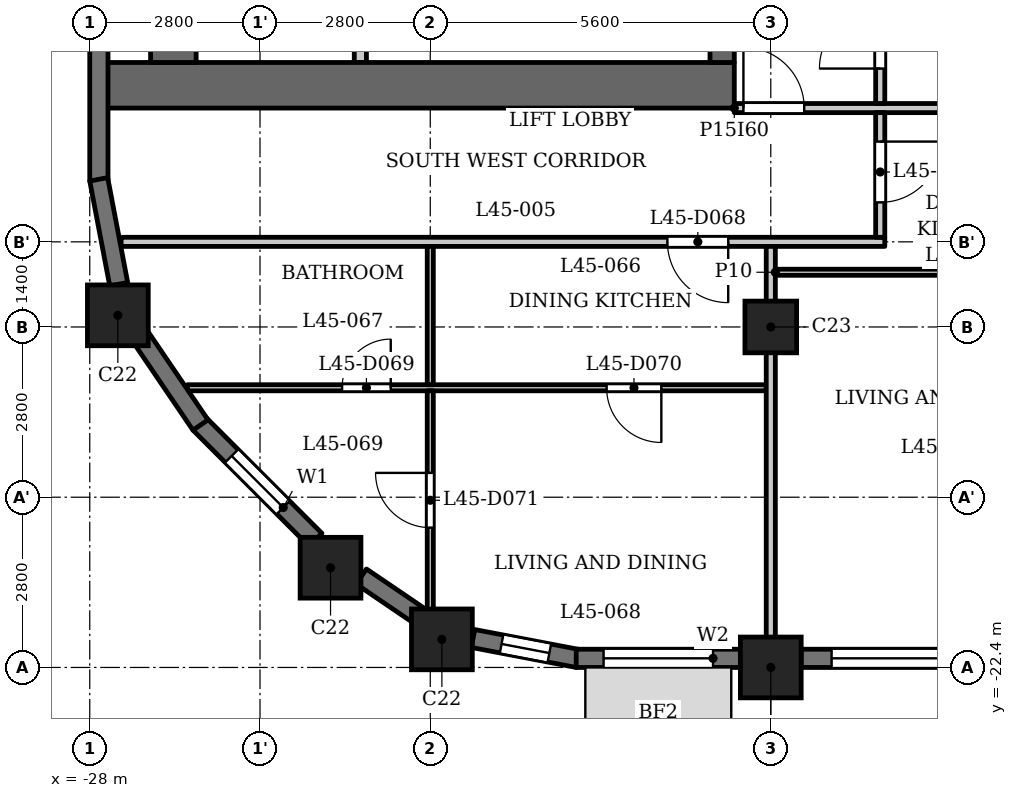
"""IFC4 building model, lengths in metres.
Left out: names, types, materials, properties, quantities, classifications, styles, units other than length and angle.
Written with IfcOpenShell. Run it as: python <this file> out.ifc"""

import sys

from ifc_helpers import new_model, si_unit, direction, frame, frame_2d, origin, origin_2d, place, context, subcontext, project, spatial, rectangle, extrude, element, fill, save


model = new_model("IFC4")
c1 = context("Model", 3, precision=1e-05, world=origin(), true_north=direction((0.0, 1.0)))
c2 = subcontext(c1, "Body", "Model", "MODEL_VIEW")
j1 = project(units=[si_unit("LENGTHUNIT", "METRE"), si_unit("PLANEANGLEUNIT", "RADIAN")], contexts=[c1])
p1 = place(None, origin())
s1 = spatial("IfcSite", under=j1, at=p1, CompositionType="ELEMENT")
p2 = place(p1, origin())
s2 = spatial("IfcBuilding", under=s1, at=p2, CompositionType="ELEMENT")
p3 = place(p2, frame((0.0, 0.0, 174.6)))
s3 = spatial("IfcBuildingStorey", under=s2, at=p3, CompositionType="ELEMENT", Elevation=174.6)
for number, where, z_axis, x_axis in (
    (1, (-22.209, -21.938, 0.0), (0.0, 0.0, 1.0), (1.0, 0.0, 0.0)),
    (2, (-16.8, -22.4, 0.0), (0.0, 0.0, 1.0), (1.0, 0.0, 0.0)),
    (3, (-27.538, -16.609, 0.0), (0.0, 0.0, 1.0), (1.0, 0.0, 0.0)),
    (4, (-24.04, -20.76, 0.0), (0.0, 0.0, 1.0), (1.0, 0.0, 0.0)),
):
    element("IfcColumn", number, at=place(p3, frame(where, z_axis=z_axis, x_axis=x_axis)), inside=s3, PredefinedType="COLUMN", context=c2, shape_type="SweptSolid", body=[
        extrude(rectangle(XDim=1.0, YDim=1.0, at=origin_2d()), origin(), (0.0, 0.0, 1.0), 3.5),
    ])
p4 = place(p3, frame((-16.8, -16.8, 0.0), z_axis=(0.0, 0.0, 1.0), x_axis=(1.0, 0.0, 0.0)))
e5 = element("IfcColumn", 5, at=p4, inside=s3, PredefinedType="COLUMN", context=c2, shape_type="SweptSolid", body=[
    extrude(rectangle(XDim=0.85, YDim=0.85, at=origin_2d()), origin(), (0.0, 0.0, 1.0), 3.5),
])
p5 = place(p3, frame((-26.197, -18.391, 0.0), z_axis=(0.0, 0.0, 1.0), x_axis=(0.707061571201, -0.707151988282, 0.0)))
e6 = element("IfcWall", 6, at=p5, inside=s3, PredefinedType="SOLIDWALL", context=c2, shape_type="SweptSolid", body=[
    extrude(rectangle(XDim=2.7, YDim=0.3, at=frame_2d((1.35, 0.0))), origin(), (0.0, 0.0, 1.0), 2.4),
])
p6 = place(p5, frame((0.75, 0.0, 0.6)))
e7 = element("IfcOpeningElement", 7, at=p6, cuts=e6, PredefinedType="OPENING", context=c2, shape_type="SweptSolid", body=[
    extrude(rectangle(XDim=1.2, YDim=1.55, at=frame_2d((0.6, 0.775))), frame((0.0, 0.16, 0.0), z_axis=(0.0, -1.0, 0.0), x_axis=(1.0, 0.0, 0.0)), (0.0, 0.0, 1.0), 0.32),
])
p7 = place(p3, frame((-23.534, -20.904, 0.0), z_axis=(0.0, 0.0, 1.0), x_axis=(0.827103906596, -0.56204904385, 0.0)))
e8 = element("IfcWall", 8, at=p7, inside=s3, PredefinedType="SOLIDWALL", context=c2, shape_type="SweptSolid", body=[
    extrude(rectangle(XDim=1.177, YDim=0.3, at=frame_2d((0.589, 0.0))), origin(), (0.0, 0.0, 1.0), 3.15),
])
p8 = place(p3, frame((-21.697, -21.924, 0.0), z_axis=(0.0, 0.0, 1.0), x_axis=(0.982284988433, -0.187393173565, 0.0)))
e9 = element("IfcWall", 9, at=p8, inside=s3, PredefinedType="SOLIDWALL", context=c2, shape_type="SweptSolid", body=[
    extrude(rectangle(XDim=1.756, YDim=0.3, at=frame_2d((0.878, 0.0))), origin(), (0.0, 0.0, 1.0), 2.4),
])
p9 = place(p8, frame((0.478, 0.0, 0.6)))
e10 = element("IfcOpeningElement", 10, at=p9, cuts=e9, PredefinedType="OPENING", context=c2, shape_type="SweptSolid", body=[
    extrude(rectangle(XDim=0.8, YDim=1.55, at=frame_2d((0.4, 0.775))), frame((0.0, 0.16, 0.0), z_axis=(0.0, -1.0, 0.0), x_axis=(1.0, 0.0, 0.0)), (0.0, 0.0, 1.0), 0.32),
])
p10 = place(p3, frame((-20.0, -22.25, 0.0), z_axis=(0.0, 0.0, 1.0), x_axis=(1.0, 0.0, 0.0)))
e11 = element("IfcWall", 11, at=p10, inside=s3, PredefinedType="SOLIDWALL", context=c2, shape_type="SweptSolid", body=[
    extrude(rectangle(XDim=2.7, YDim=0.3, at=frame_2d((1.35, 0.0))), origin(), (0.0, 0.0, 1.0), 2.4),
])
p11 = place(p10, frame((0.45, 0.0, 0.9)))
e12 = element("IfcOpeningElement", 12, at=p11, cuts=e11, PredefinedType="OPENING", context=c2, shape_type="SweptSolid", body=[
    extrude(rectangle(XDim=1.8, YDim=1.25, at=frame_2d((0.9, 0.625))), frame((0.0, 0.16, 0.0), z_axis=(0.0, -1.0, 0.0), x_axis=(1.0, 0.0, 0.0)), (0.0, 0.0, 1.0), 0.32),
])
p12 = place(p3, frame((-16.3, -22.25, 0.0), z_axis=(0.0, 0.0, 1.0), x_axis=(1.0, 0.0, 0.0)))
e13 = element("IfcWall", 13, at=p12, inside=s3, PredefinedType="SOLIDWALL", context=c2, shape_type="SweptSolid", body=[
    extrude(rectangle(XDim=4.6, YDim=0.3, at=frame_2d((2.3, 0.0))), origin(), (0.0, 0.0, 1.0), 2.4),
])
p13 = place(p12, frame((0.5, 0.0, 1.2)))
e14 = element("IfcOpeningElement", 14, at=p13, cuts=e13, PredefinedType="OPENING", context=c2, shape_type="SweptSolid", body=[
    extrude(rectangle(XDim=3.6, YDim=0.95, at=frame_2d((1.8, 0.475))), frame((0.0, 0.16, 0.0), z_axis=(0.0, -1.0, 0.0), x_axis=(1.0, 0.0, 0.0)), (0.0, 0.0, 1.0), 0.32),
])
p14 = place(p3, frame((-27.85, -11.7, 0.0), z_axis=(0.0, 0.0, 1.0), x_axis=(0.0, -1.0, 0.0)))
e15 = element("IfcWall", 15, at=p14, inside=s3, PredefinedType="SOLIDWALL", context=c2, shape_type="SweptSolid", body=[
    extrude(rectangle(XDim=2.7, YDim=0.3, at=frame_2d((1.35, 0.0))), origin(), (0.0, 0.0, 1.0), 2.4),
])
for number, where, z_axis, x_axis in (
    (16, (-27.853, -14.372, 0.0), (0.0, 0.0, 1.0), (0.187, -0.982, 0.0)),
    (17, (-27.166, -16.96, 0.0), (0.0, 0.0, 1.0), (0.562, -0.827, 0.0)),
):
    element("IfcWall", number, at=place(p3, frame(where, z_axis=z_axis, x_axis=x_axis)), inside=s3, PredefinedType="SOLIDWALL", context=c2, shape_type="SweptSolid", body=[
        extrude(rectangle(XDim=1.756, YDim=0.3, at=frame_2d((0.878, 0.0))), origin(), (0.0, 0.0, 1.0), 2.4),
    ])
p15 = place(p3, frame((-17.4, -12.825, 0.0), z_axis=(0.0, 0.0, 1.0), x_axis=(-1.0, 0.0, 0.0)))
e18 = element("IfcWall", 18, at=p15, inside=s3, PredefinedType="SHEAR", context=c2, shape_type="SweptSolid", body=[
    extrude(rectangle(XDim=10.4, YDim=0.75, at=frame_2d((5.2, 0.0))), origin(), (0.0, 0.0, 1.0), 3.15),
])
p16 = place(p3, frame((-17.6, -12.45, 0.0), z_axis=(0.0, 0.0, 1.0), x_axis=(0.0, 1.0, 0.0)))
e19 = element("IfcWall", 19, at=p16, inside=s3, PredefinedType="SHEAR", context=c2, shape_type="SweptSolid", body=[
    extrude(rectangle(XDim=24.9, YDim=0.4, at=frame_2d((12.45, 0.0))), origin(), (0.0, 0.0, 1.0), 3.15),
])
p17 = place(p16, frame((8.65, 0.0, 0.0)))
e20 = element("IfcOpeningElement", 20, at=p17, cuts=e19, PredefinedType="OPENING", context=c2, shape_type="SweptSolid", body=[
    extrude(rectangle(XDim=0.9, YDim=2.1, at=frame_2d((0.45, 1.05))), frame((0.0, 0.21, 0.0), z_axis=(0.0, -1.0, 0.0), x_axis=(1.0, 0.0, 0.0)), (0.0, 0.0, 1.0), 0.42),
])
p18 = place(p16, frame((15.6, 0.0, 0.0)))
e21 = element("IfcOpeningElement", 21, at=p18, cuts=e19, PredefinedType="OPENING", context=c2, shape_type="SweptSolid", body=[
    extrude(rectangle(XDim=1.1, YDim=2.1, at=frame_2d((0.55, 1.05))), frame((0.0, 0.21, 0.0), z_axis=(0.0, -1.0, 0.0), x_axis=(1.0, 0.0, 0.0)), (0.0, 0.0, 1.0), 0.42),
])
p19 = place(p16, frame((18.0, 0.0, 0.0)))
e22 = element("IfcOpeningElement", 22, at=p19, cuts=e19, PredefinedType="OPENING", context=c2, shape_type="SweptSolid", body=[
    extrude(rectangle(XDim=1.1, YDim=2.1, at=frame_2d((0.55, 1.05))), frame((0.0, 0.21, 0.0), z_axis=(0.0, -1.0, 0.0), x_axis=(1.0, 0.0, 0.0)), (0.0, 0.0, 1.0), 0.42),
])
p20 = place(p16, frame((23.025, 0.0, 0.0)))
e23 = element("IfcOpeningElement", 23, at=p20, cuts=e19, PredefinedType="OPENING", context=c2, shape_type="SweptSolid", body=[
    extrude(rectangle(XDim=1.1, YDim=2.1, at=frame_2d((0.55, 1.05))), frame((0.0, 0.21, 0.0), z_axis=(0.0, -1.0, 0.0), x_axis=(1.0, 0.0, 0.0)), (0.0, 0.0, 1.0), 0.42),
])
p21 = place(p16, frame((0.775, 0.0, 0.0)))
e24 = element("IfcOpeningElement", 24, at=p21, cuts=e19, PredefinedType="OPENING", context=c2, shape_type="SweptSolid", body=[
    extrude(rectangle(XDim=1.1, YDim=2.1, at=frame_2d((0.55, 1.05))), frame((0.0, 0.21, 0.0), z_axis=(0.0, -1.0, 0.0), x_axis=(1.0, 0.0, 0.0)), (0.0, 0.0, 1.0), 0.42),
])
p22 = place(p16, frame((12.925, 0.0, 0.0)))
e25 = element("IfcOpeningElement", 25, at=p22, cuts=e19, PredefinedType="OPENING", context=c2, shape_type="SweptSolid", body=[
    extrude(rectangle(XDim=1.8, YDim=2.1, at=frame_2d((0.9, 1.05))), frame((0.0, 0.21, 0.0), z_axis=(0.0, -1.0, 0.0), x_axis=(1.0, 0.0, 0.0)), (0.0, 0.0, 1.0), 0.42),
])
p23 = place(p3, frame((-26.625, -12.45, 0.0), z_axis=(0.0, 0.0, 1.0), x_axis=(0.0, 1.0, 0.0)))
e26 = element("IfcWall", 26, at=p23, inside=s3, PredefinedType="SHEAR", context=c2, shape_type="SweptSolid", body=[
    extrude(rectangle(XDim=24.9, YDim=0.75, at=frame_2d((12.45, 0.0))), origin(), (0.0, 0.0, 1.0), 3.15),
])
p24 = place(p3, frame((-23.55, -12.45, 0.0), z_axis=(0.0, 0.0, 1.0), x_axis=(0.0, 1.0, 0.0)))
e27 = element("IfcWall", 27, at=p24, inside=s3, PredefinedType="PARTITIONING", context=c2, shape_type="SweptSolid", body=[
    extrude(rectangle(XDim=2.65, YDim=0.2, at=frame_2d((1.325, 0.0))), origin(), (0.0, 0.0, 1.0), 3.15),
])
p25 = place(p24, frame((0.875, 0.0, 0.0)))
e28 = element("IfcOpeningElement", 28, at=p25, cuts=e27, PredefinedType="OPENING", context=c2, shape_type="SweptSolid", body=[
    extrude(rectangle(XDim=0.9, YDim=2.1, at=frame_2d((0.45, 1.05))), frame((0.0, 0.11, 0.0), z_axis=(0.0, -1.0, 0.0), x_axis=(1.0, 0.0, 0.0)), (0.0, 0.0, 1.0), 0.22),
])
p26 = place(p3, frame((-26.394, -17.8, 0.0), z_axis=(0.0, 0.0, 1.0), x_axis=(1.0, 0.0, 0.0)))
e29 = element("IfcWall", 29, at=p26, inside=s3, PredefinedType="PARTITIONING", context=c2, shape_type="SweptSolid", body=[
    extrude(rectangle(XDim=9.519, YDim=0.1, at=frame_2d((4.76, 0.0))), origin(), (0.0, 0.0, 1.0), 3.15),
])
p27 = place(p26, frame((2.544, 0.0, 0.0)))
e30 = element("IfcOpeningElement", 30, at=p27, cuts=e29, PredefinedType="OPENING", context=c2, shape_type="SweptSolid", body=[
    extrude(rectangle(XDim=0.8, YDim=2.1, at=frame_2d((0.4, 1.05))), frame((0.0, 0.06, 0.0), z_axis=(0.0, -1.0, 0.0), x_axis=(1.0, 0.0, 0.0)), (0.0, 0.0, 1.0), 0.12),
])
p28 = place(p26, frame((6.894, 0.0, 0.0)))
e31 = element("IfcOpeningElement", 31, at=p28, cuts=e29, PredefinedType="OPENING", context=c2, shape_type="SweptSolid", body=[
    extrude(rectangle(XDim=0.9, YDim=2.1, at=frame_2d((0.45, 1.05))), frame((0.0, 0.06, 0.0), z_axis=(0.0, -1.0, 0.0), x_axis=(1.0, 0.0, 0.0)), (0.0, 0.0, 1.0), 0.12),
])
p29 = place(p3, frame((-16.725, -15.9, 0.0), z_axis=(0.0, 0.0, 1.0), x_axis=(1.0, 0.0, 0.0)))
e32 = element("IfcWall", 32, at=p29, inside=s3, PredefinedType="PARTITIONING", context=c2, shape_type="SweptSolid", body=[
    extrude(rectangle(XDim=33.45, YDim=0.1, at=frame_2d((16.725, 0.0))), origin(), (0.0, 0.0, 1.0), 3.15),
])
p30 = place(p29, frame((9.675, 0.0, 0.0)))
e33 = element("IfcOpeningElement", 33, at=p30, cuts=e32, PredefinedType="OPENING", context=c2, shape_type="SweptSolid", body=[
    extrude(rectangle(XDim=0.8, YDim=2.1, at=frame_2d((0.4, 1.05))), frame((0.0, 0.06, 0.0), z_axis=(0.0, -1.0, 0.0), x_axis=(1.0, 0.0, 0.0)), (0.0, 0.0, 1.0), 0.12),
])
p31 = place(p29, frame((4.075, 0.0, 0.0)))
e34 = element("IfcOpeningElement", 34, at=p31, cuts=e32, PredefinedType="OPENING", context=c2, shape_type="SweptSolid", body=[
    extrude(rectangle(XDim=0.9, YDim=2.1, at=frame_2d((0.45, 1.05))), frame((0.0, 0.06, 0.0), z_axis=(0.0, -1.0, 0.0), x_axis=(1.0, 0.0, 0.0)), (0.0, 0.0, 1.0), 0.12),
])
p32 = place(p29, frame((20.875, 0.0, 0.0)))
e35 = element("IfcOpeningElement", 35, at=p32, cuts=e32, PredefinedType="OPENING", context=c2, shape_type="SweptSolid", body=[
    extrude(rectangle(XDim=0.8, YDim=2.1, at=frame_2d((0.4, 1.05))), frame((0.0, 0.06, 0.0), z_axis=(0.0, -1.0, 0.0), x_axis=(1.0, 0.0, 0.0)), (0.0, 0.0, 1.0), 0.12),
])
p33 = place(p29, frame((15.275, 0.0, 0.0)))
e36 = element("IfcOpeningElement", 36, at=p33, cuts=e32, PredefinedType="OPENING", context=c2, shape_type="SweptSolid", body=[
    extrude(rectangle(XDim=0.9, YDim=2.1, at=frame_2d((0.45, 1.05))), frame((0.0, 0.06, 0.0), z_axis=(0.0, -1.0, 0.0), x_axis=(1.0, 0.0, 0.0)), (0.0, 0.0, 1.0), 0.12),
])
p34 = place(p29, frame((30.825, 0.0, 0.0)))
e37 = element("IfcOpeningElement", 37, at=p34, cuts=e32, PredefinedType="OPENING", context=c2, shape_type="SweptSolid", body=[
    extrude(rectangle(XDim=0.8, YDim=2.1, at=frame_2d((0.4, 1.05))), frame((0.0, 0.06, 0.0), z_axis=(0.0, -1.0, 0.0), x_axis=(1.0, 0.0, 0.0)), (0.0, 0.0, 1.0), 0.12),
])
p35 = place(p29, frame((26.475, 0.0, 0.0)))
e38 = element("IfcOpeningElement", 38, at=p35, cuts=e32, PredefinedType="OPENING", context=c2, shape_type="SweptSolid", body=[
    extrude(rectangle(XDim=0.9, YDim=2.1, at=frame_2d((0.45, 1.05))), frame((0.0, 0.06, 0.0), z_axis=(0.0, -1.0, 0.0), x_axis=(1.0, 0.0, 0.0)), (0.0, 0.0, 1.0), 0.12),
])
p36 = place(p3, frame((-27.484, -15.4, 0.0), z_axis=(0.0, 0.0, 1.0), x_axis=(1.0, 0.0, 0.0)))
e39 = element("IfcWall", 39, at=p36, inside=s3, PredefinedType="PARTITIONING", context=c2, shape_type="SweptSolid", body=[
    extrude(rectangle(XDim=12.559, YDim=0.15, at=frame_2d((6.279, 0.0))), origin(), (0.0, 0.0, 1.0), 3.15),
])
p37 = place(p36, frame((8.984, 0.0, 0.0)))
e40 = element("IfcOpeningElement", 40, at=p37, cuts=e39, PredefinedType="OPENING", context=c2, shape_type="SweptSolid", body=[
    extrude(rectangle(XDim=1.0, YDim=2.1, at=frame_2d((0.5, 1.05))), frame((0.0, 0.085, 0.0), z_axis=(0.0, -1.0, 0.0), x_axis=(1.0, 0.0, 0.0)), (0.0, 0.0, 1.0), 0.17),
])
p38 = place(p3, frame((-17.4, -13.2, 0.0), z_axis=(0.0, 0.0, 1.0), x_axis=(1.0, 0.0, 0.0)))
e41 = element("IfcWall", 41, at=p38, inside=s3, PredefinedType="PARTITIONING", context=c2, shape_type="SweptSolid", body=[
    extrude(rectangle(XDim=34.8, YDim=0.15, at=frame_2d((17.4, 0.0))), origin(), (0.0, 0.0, 1.0), 3.15),
])
p39 = place(p38, frame((0.15, 0.0, 0.0)))
e42 = element("IfcOpeningElement", 42, at=p39, cuts=e41, PredefinedType="OPENING", context=c2, shape_type="SweptSolid", body=[
    extrude(rectangle(XDim=1.0, YDim=2.1, at=frame_2d((0.5, 1.05))), frame((0.0, 0.085, 0.0), z_axis=(0.0, -1.0, 0.0), x_axis=(1.0, 0.0, 0.0)), (0.0, 0.0, 1.0), 0.17),
])
p40 = place(p38, frame((33.55, 0.0, 0.0)))
e43 = element("IfcOpeningElement", 43, at=p40, cuts=e41, PredefinedType="OPENING", context=c2, shape_type="SweptSolid", body=[
    extrude(rectangle(XDim=1.0, YDim=2.1, at=frame_2d((0.5, 1.05))), frame((0.0, 0.085, 0.0), z_axis=(0.0, -1.0, 0.0), x_axis=(1.0, 0.0, 0.0)), (0.0, 0.0, 1.0), 0.17),
])
p41 = place(p38, frame((15.7, 0.0, 0.0)))
e44 = element("IfcOpeningElement", 44, at=p41, cuts=e41, PredefinedType="OPENING", context=c2, shape_type="SweptSolid", body=[
    extrude(rectangle(XDim=1.0, YDim=2.1, at=frame_2d((0.5, 1.05))), frame((0.0, 0.085, 0.0), z_axis=(0.0, -1.0, 0.0), x_axis=(1.0, 0.0, 0.0)), (0.0, 0.0, 1.0), 0.17),
])
p42 = place(p38, frame((26.9, 0.0, 0.0)))
e45 = element("IfcOpeningElement", 45, at=p42, cuts=e41, PredefinedType="OPENING", context=c2, shape_type="SweptSolid", body=[
    extrude(rectangle(XDim=1.0, YDim=2.1, at=frame_2d((0.5, 1.05))), frame((0.0, 0.085, 0.0), z_axis=(0.0, -1.0, 0.0), x_axis=(1.0, 0.0, 0.0)), (0.0, 0.0, 1.0), 0.17),
])
p43 = place(p3, frame((-22.4, -21.72, 0.0), z_axis=(0.0, 0.0, 1.0), x_axis=(0.0, 1.0, 0.0)))
e46 = element("IfcWall", 46, at=p43, inside=s3, PredefinedType="PARTITIONING", context=c2, shape_type="SweptSolid", body=[
    extrude(rectangle(XDim=3.87, YDim=0.1, at=frame_2d((1.935, 0.0))), origin(), (0.0, 0.0, 1.0), 3.15),
])
p44 = place(p43, frame((1.62, 0.0, 0.0)))
e47 = element("IfcOpeningElement", 47, at=p44, cuts=e46, PredefinedType="OPENING", context=c2, shape_type="SweptSolid", body=[
    extrude(rectangle(XDim=0.9, YDim=2.1, at=frame_2d((0.45, 1.05))), frame((0.0, 0.06, 0.0), z_axis=(0.0, -1.0, 0.0), x_axis=(1.0, 0.0, 0.0)), (0.0, 0.0, 1.0), 0.12),
])
p45 = place(p3, frame((-22.4, -17.75, 0.0), z_axis=(0.0, 0.0, 1.0), x_axis=(0.0, 1.0, 0.0)))
e48 = element("IfcWall", 48, at=p45, inside=s3, PredefinedType="PARTITIONING", context=c2, shape_type="SweptSolid", body=[
    extrude(rectangle(XDim=2.275, YDim=0.1, at=frame_2d((1.137, 0.0))), origin(), (0.0, 0.0, 1.0), 3.15),
])
p46 = place(p3, frame((-16.8, -22.88, 0.0), z_axis=(0.0, 0.0, 1.0), x_axis=(0.0, 1.0, 0.0)))
e49 = element("IfcWall", 49, at=p46, inside=s3, PredefinedType="PARTITIONING", context=c2, shape_type="SweptSolid", body=[
    extrude(rectangle(XDim=7.405, YDim=0.15, at=frame_2d((3.702, 0.0))), origin(), (0.0, 0.0, 1.0), 3.15),
])
p47 = place(p3, frame((-15.0, -15.325, 0.0), z_axis=(0.0, 0.0, 1.0), x_axis=(0.0, 1.0, 0.0)))
e50 = element("IfcWall", 50, at=p47, inside=s3, PredefinedType="PARTITIONING", context=c2, shape_type="SweptSolid", body=[
    extrude(rectangle(XDim=2.05, YDim=0.15, at=frame_2d((1.025, 0.0))), origin(), (0.0, 0.0, 1.0), 3.15),
])
p48 = place(p47, frame((0.574, 0.0, 0.0)))
e51 = element("IfcOpeningElement", 51, at=p48, cuts=e50, PredefinedType="OPENING", context=c2, shape_type="SweptSolid", body=[
    extrude(rectangle(XDim=1.0, YDim=2.1, at=frame_2d((0.5, 1.05))), frame((0.0, 0.085, 0.0), z_axis=(0.0, -1.0, 0.0), x_axis=(1.0, 0.0, 0.0)), (0.0, 0.0, 1.0), 0.17),
])
p49 = place(p3, frame((-15.0, -13.125, 0.0), z_axis=(0.0, 0.0, 1.0), x_axis=(0.0, 1.0, 0.0)))
e52 = element("IfcWall", 52, at=p49, inside=s3, PredefinedType="PARTITIONING", context=c2, shape_type="SweptSolid", body=[
    extrude(rectangle(XDim=6.356, YDim=0.15, at=frame_2d((3.178, 0.0))), origin(), (0.0, 0.0, 1.0), 3.15),
])
p50 = place(p49, frame((0.575, 0.0, 0.0)))
e53 = element("IfcOpeningElement", 53, at=p50, cuts=e52, PredefinedType="OPENING", context=c2, shape_type="SweptSolid", body=[
    extrude(rectangle(XDim=1.0, YDim=2.1, at=frame_2d((0.5, 1.05))), frame((0.0, 0.085, 0.0), z_axis=(0.0, -1.0, 0.0), x_axis=(1.0, 0.0, 0.0)), (0.0, 0.0, 1.0), 0.17),
])
p51 = place(p50, origin())
e54 = element("IfcDoor", 54, at=p51, inside=s3, OperationType="SINGLE_SWING_RIGHT", PredefinedType="DOOR", context=c2, shape_type="SweptSolid", body=[
    extrude(rectangle(XDim=1.0, YDim=2.1, at=frame_2d((0.5, 1.05))), frame((0.0, 0.025, 0.0), z_axis=(0.0, -1.0, 0.0), x_axis=(1.0, 0.0, 0.0)), (0.0, 0.0, 1.0), 0.05),
])
fill(e53, e54)
p52 = place(p39, origin())
e55 = element("IfcDoor", 55, at=p52, inside=s3, OperationType="SINGLE_SWING_RIGHT", PredefinedType="DOOR", context=c2, shape_type="SweptSolid", body=[
    extrude(rectangle(XDim=1.0, YDim=2.1, at=frame_2d((0.5, 1.05))), frame((0.0, 0.025, 0.0), z_axis=(0.0, -1.0, 0.0), x_axis=(1.0, 0.0, 0.0)), (0.0, 0.0, 1.0), 0.05),
])
fill(e42, e55)
p53 = place(p48, origin())
e56 = element("IfcDoor", 56, at=p53, inside=s3, OperationType="SINGLE_SWING_RIGHT", PredefinedType="DOOR", context=c2, shape_type="SweptSolid", body=[
    extrude(rectangle(XDim=1.0, YDim=2.1, at=frame_2d((0.5, 1.05))), frame((0.0, 0.025, 0.0), z_axis=(0.0, -1.0, 0.0), x_axis=(1.0, 0.0, 0.0)), (0.0, 0.0, 1.0), 0.05),
])
fill(e51, e56)
p54 = place(p37, origin())
e57 = element("IfcDoor", 57, at=p54, inside=s3, OperationType="SINGLE_SWING_RIGHT", PredefinedType="DOOR", context=c2, shape_type="SweptSolid", body=[
    extrude(rectangle(XDim=1.0, YDim=2.1, at=frame_2d((0.5, 1.05))), frame((0.0, 0.025, 0.0), z_axis=(0.0, -1.0, 0.0), x_axis=(1.0, 0.0, 0.0)), (0.0, 0.0, 1.0), 0.05),
])
fill(e40, e57)
p55 = place(p27, origin())
e58 = element("IfcDoor", 58, at=p55, inside=s3, OperationType="SINGLE_SWING_LEFT", PredefinedType="DOOR", context=c2, shape_type="SweptSolid", body=[
    extrude(rectangle(XDim=0.8, YDim=2.1, at=frame_2d((0.4, 1.05))), frame((0.0, 0.025, 0.0), z_axis=(0.0, -1.0, 0.0), x_axis=(1.0, 0.0, 0.0)), (0.0, 0.0, 1.0), 0.05),
])
fill(e30, e58)
p56 = place(p28, origin())
e59 = element("IfcDoor", 59, at=p56, inside=s3, OperationType="SINGLE_SWING_RIGHT", PredefinedType="DOOR", context=c2, shape_type="SweptSolid", body=[
    extrude(rectangle(XDim=0.9, YDim=2.1, at=frame_2d((0.45, 1.05))), frame((0.0, 0.025, 0.0), z_axis=(0.0, -1.0, 0.0), x_axis=(1.0, 0.0, 0.0)), (0.0, 0.0, 1.0), 0.05),
])
fill(e31, e59)
p57 = place(p44, origin())
e60 = element("IfcDoor", 60, at=p57, inside=s3, OperationType="SINGLE_SWING_LEFT", PredefinedType="DOOR", context=c2, shape_type="SweptSolid", body=[
    extrude(rectangle(XDim=0.9, YDim=2.1, at=frame_2d((0.45, 1.05))), frame((0.0, 0.025, 0.0), z_axis=(0.0, -1.0, 0.0), x_axis=(1.0, 0.0, 0.0)), (0.0, 0.0, 1.0), 0.05),
])
fill(e47, e60)
p58 = place(p6, origin())
e61 = element("IfcWindow", 61, at=p58, inside=s3, PartitioningType="SINGLE_PANEL", PredefinedType="WINDOW", context=c2, shape_type="SweptSolid", body=[
    extrude(rectangle(XDim=1.2, YDim=1.55, at=frame_2d((0.6, 0.775))), frame((0.0, 0.03, 0.0), z_axis=(0.0, -1.0, 0.0), x_axis=(1.0, 0.0, 0.0)), (0.0, 0.0, 1.0), 0.06),
])
fill(e7, e61)
p59 = place(p9, origin())
e62 = element("IfcWindow", 62, at=p59, inside=s3, PartitioningType="SINGLE_PANEL", PredefinedType="WINDOW", context=c2, shape_type="SweptSolid", body=[
    extrude(rectangle(XDim=0.8, YDim=1.55, at=frame_2d((0.4, 0.775))), frame((0.0, 0.03, 0.0), z_axis=(0.0, -1.0, 0.0), x_axis=(1.0, 0.0, 0.0)), (0.0, 0.0, 1.0), 0.06),
])
fill(e10, e62)
p60 = place(p11, origin())
e63 = element("IfcWindow", 63, at=p60, inside=s3, PartitioningType="SINGLE_PANEL", PredefinedType="WINDOW", context=c2, shape_type="SweptSolid", body=[
    extrude(rectangle(XDim=1.8, YDim=1.25, at=frame_2d((0.9, 0.625))), frame((0.0, 0.03, 0.0), z_axis=(0.0, -1.0, 0.0), x_axis=(1.0, 0.0, 0.0)), (0.0, 0.0, 1.0), 0.06),
])
fill(e12, e63)
p61 = place(p13, origin())
e64 = element("IfcWindow", 64, at=p61, inside=s3, PartitioningType="SINGLE_PANEL", PredefinedType="WINDOW", context=c2, shape_type="SweptSolid", body=[
    extrude(rectangle(XDim=3.6, YDim=0.95, at=frame_2d((1.8, 0.475))), frame((0.0, 0.03, 0.0), z_axis=(0.0, -1.0, 0.0), x_axis=(1.0, 0.0, 0.0)), (0.0, 0.0, 1.0), 0.06),
])
fill(e14, e64)
save(model, sys.argv[1])
